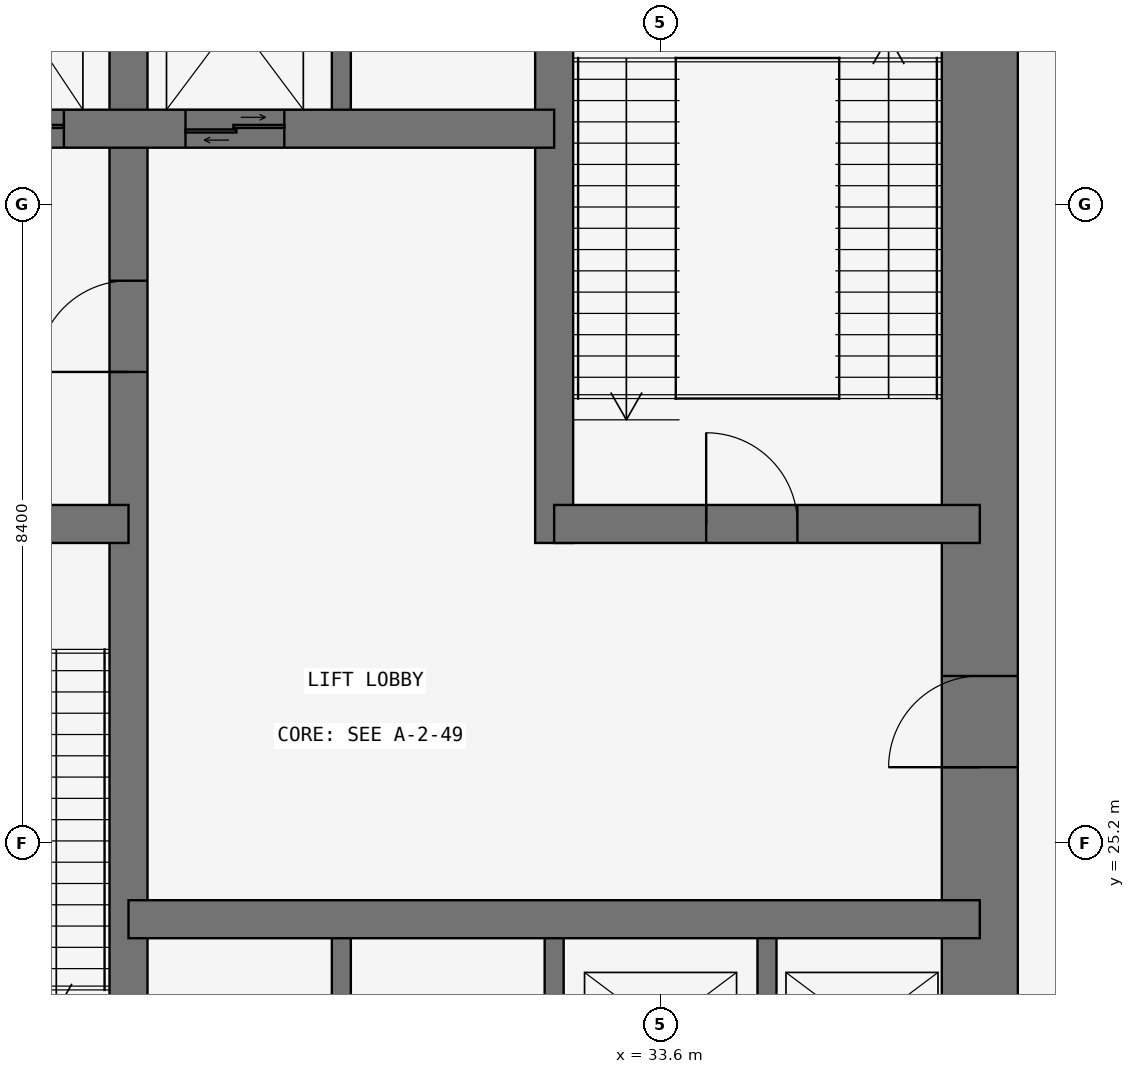
"""IFC4 building model, lengths in metres.
Left out: names, types, materials, properties, quantities, classifications, styles, units other than length and angle.
Written with IfcOpenShell. Run it as: python <this file> out.ifc"""

import sys

from ifc_helpers import new_model, si_unit, direction, frame, frame_2d, origin, place, context, subcontext, project, spatial, rectangle, extrude, element, fill, save


model = new_model("IFC4")
c1 = context("Model", 3, precision=1e-05, world=origin(), true_north=direction((0.0, 1.0)))
c2 = subcontext(c1, "Body", "Model", "MODEL_VIEW")
j1 = project(units=[si_unit("LENGTHUNIT", "METRE"), si_unit("PLANEANGLEUNIT", "RADIAN")], contexts=[c1])
p1 = place(None, origin())
s1 = spatial("IfcSite", under=j1, at=p1, CompositionType="ELEMENT")
p2 = place(p1, origin())
s2 = spatial("IfcBuilding", under=s1, at=p2, CompositionType="ELEMENT")
p3 = place(p2, frame((0.0, 0.0, 177.3)))
s3 = spatial("IfcBuildingStorey", under=s2, at=p3, CompositionType="ELEMENT", Elevation=177.3)
p4 = place(p3, frame((37.8, 21.0, 0.0), z_axis=(0.0, 0.0, 1.0), x_axis=(0.0, 1.0, 0.0)))
e1 = element("IfcWall", 1, at=p4, inside=s3, PredefinedType="SHEAR", context=c2, shape_type="SweptSolid", body=[
    extrude(rectangle(XDim=17.3, YDim=1.0, at=frame_2d((8.65, 0.0))), origin(), (0.0, 0.0, 1.0), 6.0),
])
p5 = place(p4, frame((5.2, 0.0, 0.0)))
e2 = element("IfcOpeningElement", 2, at=p5, cuts=e1, PredefinedType="OPENING", context=c2, shape_type="SweptSolid", body=[
    extrude(rectangle(XDim=1.2, YDim=2.1, at=frame_2d((0.6, 1.05))), frame((0.0, 0.51, 0.0), z_axis=(0.0, -1.0, 0.0), x_axis=(1.0, 0.0, 0.0)), (0.0, 0.0, 1.0), 1.02),
])
p6 = place(p3, frame((26.6, 21.0, 0.0), z_axis=(0.0, 0.0, 1.0), x_axis=(0.0, 1.0, 0.0)))
e3 = element("IfcWall", 3, at=p6, inside=s3, PredefinedType="SHEAR", context=c2, shape_type="SweptSolid", body=[
    extrude(rectangle(XDim=16.8, YDim=0.5, at=frame_2d((8.4, 0.0))), origin(), (0.0, 0.0, 1.0), 6.0),
])
p7 = place(p6, frame((10.4, 0.0, 0.0)))
e4 = element("IfcOpeningElement", 4, at=p7, cuts=e3, PredefinedType="OPENING", context=c2, shape_type="SweptSolid", body=[
    extrude(rectangle(XDim=1.2, YDim=2.1, at=frame_2d((0.6, 1.05))), frame((0.0, 0.26, 0.0), z_axis=(0.0, -1.0, 0.0), x_axis=(1.0, 0.0, 0.0)), (0.0, 0.0, 1.0), 0.52),
])
p8 = place(p3, frame((21.0, 29.4, 0.0), z_axis=(0.0, 0.0, 1.0), x_axis=(1.0, 0.0, 0.0)))
e5 = element("IfcWall", 5, at=p8, inside=s3, PredefinedType="SHEAR", context=c2, shape_type="SweptSolid", body=[
    extrude(rectangle(XDim=5.6, YDim=0.5, at=frame_2d((2.8, 0.0))), origin(), (0.0, 0.0, 1.0), 6.0),
])
p9 = place(p8, frame((2.3, 0.0, 0.0)))
e6 = element("IfcOpeningElement", 6, at=p9, cuts=e5, PredefinedType="OPENING", context=c2, shape_type="SweptSolid", body=[
    extrude(rectangle(XDim=1.2, YDim=2.1, at=frame_2d((0.6, 1.05))), frame((0.0, 0.26, 0.0), z_axis=(0.0, -1.0, 0.0), x_axis=(1.0, 0.0, 0.0)), (0.0, 0.0, 1.0), 0.52),
])
p10 = place(p3, frame((21.0, 34.6, 0.0), z_axis=(0.0, 0.0, 1.0), x_axis=(1.0, 0.0, 0.0)))
e7 = element("IfcWall", 7, at=p10, inside=s3, PredefinedType="SHEAR", context=c2, shape_type="SweptSolid", body=[
    extrude(rectangle(XDim=11.2, YDim=0.5, at=frame_2d((5.6, 0.0))), origin(), (0.0, 0.0, 1.0), 6.0),
])
p11 = place(p10, frame((1.0, 0.0, 0.0)))
e8 = element("IfcOpeningElement", 8, at=p11, cuts=e7, PredefinedType="OPENING", context=c2, shape_type="SweptSolid", body=[
    extrude(rectangle(XDim=1.1, YDim=2.1, at=frame_2d((0.55, 1.05))), frame((0.0, 0.26, 0.0), z_axis=(0.0, -1.0, 0.0), x_axis=(1.0, 0.0, 0.0)), (0.0, 0.0, 1.0), 0.52),
])
p12 = place(p10, frame((3.65, 0.0, 0.0)))
e9 = element("IfcOpeningElement", 9, at=p12, cuts=e7, PredefinedType="OPENING", context=c2, shape_type="SweptSolid", body=[
    extrude(rectangle(XDim=1.1, YDim=2.1, at=frame_2d((0.55, 1.05))), frame((0.0, 0.26, 0.0), z_axis=(0.0, -1.0, 0.0), x_axis=(1.0, 0.0, 0.0)), (0.0, 0.0, 1.0), 0.52),
])
p13 = place(p10, frame((6.35, 0.0, 0.0)))
e10 = element("IfcOpeningElement", 10, at=p13, cuts=e7, PredefinedType="OPENING", context=c2, shape_type="SweptSolid", body=[
    extrude(rectangle(XDim=1.3, YDim=2.1, at=frame_2d((0.65, 1.05))), frame((0.0, 0.26, 0.0), z_axis=(0.0, -1.0, 0.0), x_axis=(1.0, 0.0, 0.0)), (0.0, 0.0, 1.0), 0.52),
])
p14 = place(p3, frame((26.6, 24.2, 0.0), z_axis=(0.0, 0.0, 1.0), x_axis=(1.0, 0.0, 0.0)))
e11 = element("IfcWall", 11, at=p14, inside=s3, PredefinedType="SHEAR", context=c2, shape_type="SweptSolid", body=[
    extrude(rectangle(XDim=11.2, YDim=0.5, at=frame_2d((5.6, 0.0))), origin(), (0.0, 0.0, 1.0), 6.0),
])
p15 = place(p3, frame((32.2, 29.15, 0.0), z_axis=(0.0, 0.0, 1.0), x_axis=(0.0, 1.0, 0.0)))
e12 = element("IfcWall", 12, at=p15, inside=s3, PredefinedType="SHEAR", context=c2, shape_type="SweptSolid", body=[
    extrude(rectangle(XDim=8.65, YDim=0.5, at=frame_2d((4.325, 0.0))), origin(), (0.0, 0.0, 1.0), 6.0),
])
p16 = place(p3, frame((32.2, 29.4, 0.0), z_axis=(0.0, 0.0, 1.0), x_axis=(1.0, 0.0, 0.0)))
e13 = element("IfcWall", 13, at=p16, inside=s3, PredefinedType="SHEAR", context=c2, shape_type="SweptSolid", body=[
    extrude(rectangle(XDim=5.6, YDim=0.5, at=frame_2d((2.8, 0.0))), origin(), (0.0, 0.0, 1.0), 6.0),
])
p17 = place(p16, frame((2.0, 0.0, 0.0)))
e14 = element("IfcOpeningElement", 14, at=p17, cuts=e13, PredefinedType="OPENING", context=c2, shape_type="SweptSolid", body=[
    extrude(rectangle(XDim=1.2, YDim=2.1, at=frame_2d((0.6, 1.05))), frame((0.0, 0.26, 0.0), z_axis=(0.0, -1.0, 0.0), x_axis=(1.0, 0.0, 0.0)), (0.0, 0.0, 1.0), 0.52),
])
for number, where, z_axis, x_axis in (
    (15, (29.4, 21.0, 0.0), (0.0, 0.0, 1.0), (0.0, 1.0, 0.0)),
    (16, (32.2, 21.0, 0.0), (0.0, 0.0, 1.0), (0.0, 1.0, 0.0)),
    (17, (35.0, 21.0, 0.0), (0.0, 0.0, 1.0), (0.0, 1.0, 0.0)),
    (18, (29.4, 34.6, 0.0), (0.0, 0.0, 1.0), (0.0, 1.0, 0.0)),
):
    element("IfcWall", number, at=place(p3, frame(where, z_axis=z_axis, x_axis=x_axis)), inside=s3, PredefinedType="SHEAR", context=c2, shape_type="SweptSolid", body=[
        extrude(rectangle(XDim=3.2, YDim=0.25, at=frame_2d((1.6, 0.0))), origin(), (0.0, 0.0, 1.0), 6.0),
    ])
p18 = place(p7, origin())
e19 = element("IfcDoor", 19, at=p18, inside=s3, OperationType="SINGLE_SWING_LEFT", PredefinedType="DOOR", context=c2, shape_type="SweptSolid", body=[
    extrude(rectangle(XDim=1.2, YDim=2.1, at=frame_2d((0.6, 1.05))), frame((0.0, 0.025, 0.0), z_axis=(0.0, -1.0, 0.0), x_axis=(1.0, 0.0, 0.0)), (0.0, 0.0, 1.0), 0.05),
])
fill(e4, e19)
p19 = place(p5, origin())
e20 = element("IfcDoor", 20, at=p19, inside=s3, OperationType="SINGLE_SWING_LEFT", PredefinedType="DOOR", context=c2, shape_type="SweptSolid", body=[
    extrude(rectangle(XDim=1.2, YDim=2.1, at=frame_2d((0.6, 1.05))), frame((0.0, 0.025, 0.0), z_axis=(0.0, -1.0, 0.0), x_axis=(1.0, 0.0, 0.0)), (0.0, 0.0, 1.0), 0.05),
])
fill(e2, e20)
p20 = place(p17, origin())
e21 = element("IfcDoor", 21, at=p20, inside=s3, OperationType="SINGLE_SWING_LEFT", PredefinedType="DOOR", context=c2, shape_type="SweptSolid", body=[
    extrude(rectangle(XDim=1.2, YDim=2.1, at=frame_2d((0.6, 1.05))), frame((0.0, 0.025, 0.0), z_axis=(0.0, -1.0, 0.0), x_axis=(1.0, 0.0, 0.0)), (0.0, 0.0, 1.0), 0.05),
])
fill(e14, e21)
p21 = place(p12, origin())
e22 = element("IfcDoor", 22, at=p21, inside=s3, OperationType="DOUBLE_DOOR_SLIDING", PredefinedType="DOOR", context=c2, shape_type="SweptSolid", body=[
    extrude(rectangle(XDim=1.1, YDim=2.1, at=frame_2d((0.55, 1.05))), frame((0.0, 0.025, 0.0), z_axis=(0.0, -1.0, 0.0), x_axis=(1.0, 0.0, 0.0)), (0.0, 0.0, 1.0), 0.05),
])
fill(e9, e22)
p22 = place(p13, origin())
e23 = element("IfcDoor", 23, at=p22, inside=s3, OperationType="DOUBLE_DOOR_SLIDING", PredefinedType="DOOR", context=c2, shape_type="SweptSolid", body=[
    extrude(rectangle(XDim=1.3, YDim=2.1, at=frame_2d((0.65, 1.05))), frame((0.0, 0.025, 0.0), z_axis=(0.0, -1.0, 0.0), x_axis=(1.0, 0.0, 0.0)), (0.0, 0.0, 1.0), 0.05),
])
fill(e10, e23)
save(model, sys.argv[1])
